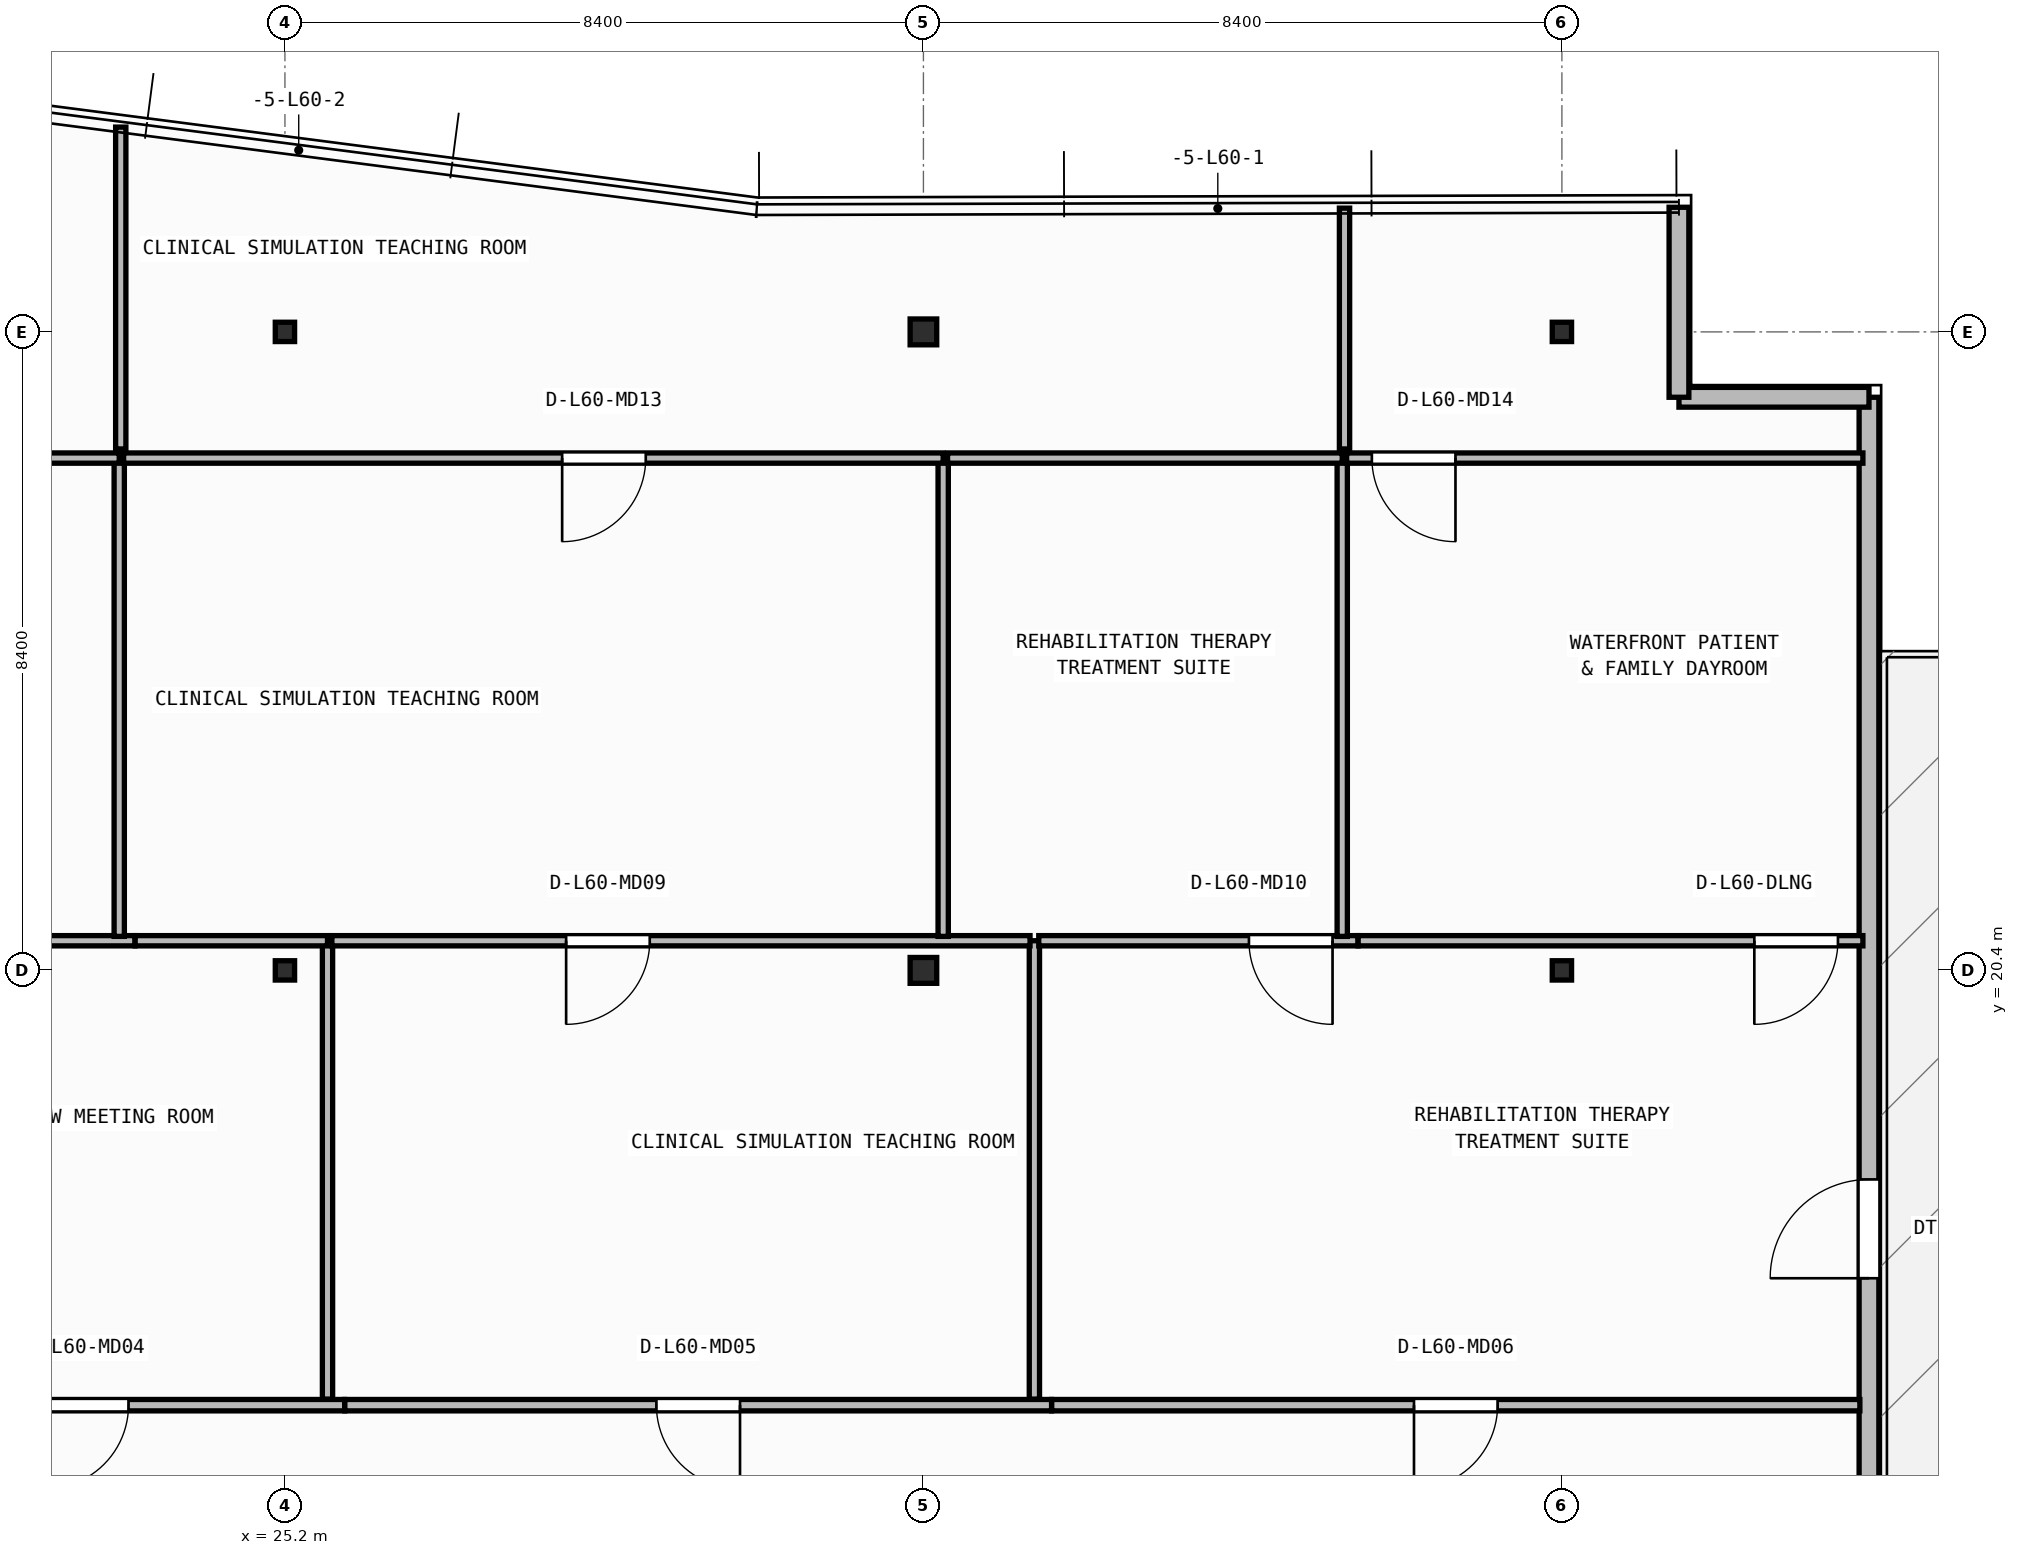
"""IFC4 building model, lengths in metres.
Left out: names, types, materials, properties, quantities, classifications, styles, units other than length and angle.
Written with IfcOpenShell. Run it as: python <this file> out.ifc"""

import sys

from ifc_helpers import new_model, si_unit, direction, frame, frame_2d, origin, origin_2d, place, context, subcontext, project, spatial, rectangle, i_section, extrude, element, fill, save


model = new_model("IFC4")
c1 = context("Model", 3, precision=1e-05, world=origin(), true_north=direction((0.0, 1.0)))
c2 = subcontext(c1, "Body", "Model", "MODEL_VIEW")
j1 = project(units=[si_unit("LENGTHUNIT", "METRE"), si_unit("PLANEANGLEUNIT", "RADIAN")], contexts=[c1])
p1 = place(None, origin())
s1 = spatial("IfcSite", under=j1, at=p1, CompositionType="ELEMENT")
p2 = place(p1, origin())
s2 = spatial("IfcBuilding", under=s1, at=p2, CompositionType="ELEMENT")
p3 = place(p2, frame((0.0, 0.0, 244.7)))
s3 = spatial("IfcBuildingStorey", under=s2, at=p3, CompositionType="ELEMENT", Elevation=244.7)
p4 = place(p3, frame((25.2, 20.4, 0.0), z_axis=(0.0, 0.0, 1.0), x_axis=(1.0, 0.0, 0.0)))
e1 = element("IfcColumn", 1, at=p4, inside=s3, PredefinedType="COLUMN", context=c2, shape_type="SweptSolid", body=[
    extrude(i_section(OverallWidth=0.254, OverallDepth=0.254, WebThickness=0.009, FlangeThickness=0.014, FilletRadius=0.013, at=origin_2d()), origin(), (0.0, 0.0, 1.0), 3.95),
])
p5 = place(p3, frame((33.6, 20.4, 0.0), z_axis=(0.0, 0.0, 1.0), x_axis=(1.0, 0.0, 0.0)))
e2 = element("IfcColumn", 2, at=p5, inside=s3, PredefinedType="COLUMN", context=c2, shape_type="SweptSolid", body=[
    extrude(i_section(OverallWidth=0.35, OverallDepth=0.34, WebThickness=0.016, FlangeThickness=0.028, at=origin_2d()), origin(), (0.0, 0.0, 1.0), 3.95),
])
for number, where, z_axis, x_axis in (
    (3, (42.0, 20.4, 0.0), (0.0, 0.0, 1.0), (1.0, 0.0, 0.0)),
    (4, (25.2, 28.8, 0.0), (0.0, 0.0, 1.0), (1.0, 0.0, 0.0)),
):
    element("IfcColumn", number, at=place(p3, frame(where, z_axis=z_axis, x_axis=x_axis)), inside=s3, PredefinedType="COLUMN", context=c2, shape_type="SweptSolid", body=[
        extrude(i_section(OverallWidth=0.254, OverallDepth=0.254, WebThickness=0.009, FlangeThickness=0.014, FilletRadius=0.013, at=origin_2d()), origin(), (0.0, 0.0, 1.0), 3.95),
    ])
p6 = place(p3, frame((33.6, 28.8, 0.0), z_axis=(0.0, 0.0, 1.0), x_axis=(1.0, 0.0, 0.0)))
e5 = element("IfcColumn", 5, at=p6, inside=s3, PredefinedType="COLUMN", context=c2, shape_type="SweptSolid", body=[
    extrude(i_section(OverallWidth=0.35, OverallDepth=0.34, WebThickness=0.016, FlangeThickness=0.028, at=origin_2d()), origin(), (0.0, 0.0, 1.0), 3.95),
])
p7 = place(p3, frame((42.0, 28.8, 0.0), z_axis=(0.0, 0.0, 1.0), x_axis=(1.0, 0.0, 0.0)))
e6 = element("IfcColumn", 6, at=p7, inside=s3, PredefinedType="COLUMN", context=c2, shape_type="SweptSolid", body=[
    extrude(i_section(OverallWidth=0.254, OverallDepth=0.254, WebThickness=0.009, FlangeThickness=0.014, FilletRadius=0.013, at=origin_2d()), origin(), (0.0, 0.0, 1.0), 3.95),
])
p8 = place(p3, frame((46.04, 6.06, 0.0), z_axis=(0.0, 0.0, 1.0), x_axis=(0.0, 1.0, 0.0)))
e7 = element("IfcWall", 7, at=p8, inside=s3, PredefinedType="STANDARD", context=c2, shape_type="SweptSolid", body=[
    extrude(rectangle(XDim=21.88, YDim=0.26, at=frame_2d((10.94, 0.0))), origin(), (0.0, 0.0, 1.0), 3.71),
])
p9 = place(p8, frame((10.29, 0.0, 0.0)))
e8 = element("IfcOpeningElement", 8, at=p9, cuts=e7, PredefinedType="OPENING", context=c2, shape_type="SweptSolid", body=[
    extrude(rectangle(XDim=1.3, YDim=2.15, at=frame_2d((0.65, 1.075))), frame((0.0, 0.14, 0.0), z_axis=(0.0, -1.0, 0.0), x_axis=(1.0, 0.0, 0.0)), (0.0, 0.0, 1.0), 0.28),
])
p10 = place(p3, frame((46.04, 27.94, 0.0), z_axis=(0.0, 0.0, 1.0), x_axis=(-1.0, 0.0, 0.0)))
e9 = element("IfcWall", 9, at=p10, inside=s3, PredefinedType="STANDARD", context=c2, shape_type="SweptSolid", body=[
    extrude(rectangle(XDim=2.5, YDim=0.26, at=frame_2d((1.25, 0.0))), origin(), (0.0, 0.0, 1.0), 3.71),
])
p11 = place(p3, frame((43.54, 27.94, 0.0), z_axis=(0.0, 0.0, 1.0), x_axis=(0.0, 1.0, 0.0)))
e10 = element("IfcWall", 10, at=p11, inside=s3, PredefinedType="STANDARD", context=c2, shape_type="SweptSolid", body=[
    extrude(rectangle(XDim=2.5, YDim=0.26, at=frame_2d((1.25, 0.0))), origin(), (0.0, 0.0, 1.0), 3.71),
])
p12 = place(p3, frame((25.986, 14.68, 0.0), z_axis=(0.0, 0.0, 1.0), x_axis=(-1.0, 0.0, 0.0)))
e11 = element("IfcWall", 11, at=p12, inside=s3, PredefinedType="PARTITIONING", context=c2, shape_type="SweptSolid", body=[
    extrude(rectangle(XDim=6.788, YDim=0.15, at=frame_2d((3.394, 0.0))), origin(), (0.0, 0.0, 1.0), 3.71),
])
p13 = place(p12, frame((2.844, 0.0, 0.0)))
e12 = element("IfcOpeningElement", 12, at=p13, cuts=e11, PredefinedType="OPENING", context=c2, shape_type="SweptSolid", body=[
    extrude(rectangle(XDim=1.1, YDim=2.1, at=frame_2d((0.55, 1.05))), frame((0.0, 0.085, 0.0), z_axis=(0.0, -1.0, 0.0), x_axis=(1.0, 0.0, 0.0)), (0.0, 0.0, 1.0), 0.17),
])
p14 = place(p3, frame((35.286, 14.68, 0.0), z_axis=(0.0, 0.0, 1.0), x_axis=(-1.0, 0.0, 0.0)))
e13 = element("IfcWall", 13, at=p14, inside=s3, PredefinedType="PARTITIONING", context=c2, shape_type="SweptSolid", body=[
    extrude(rectangle(XDim=9.298, YDim=0.15, at=frame_2d((4.649, 0.0))), origin(), (0.0, 0.0, 1.0), 3.71),
])
p15 = place(p14, frame((4.099, 0.0, 0.0)))
e14 = element("IfcOpeningElement", 14, at=p15, cuts=e13, PredefinedType="OPENING", context=c2, shape_type="SweptSolid", body=[
    extrude(rectangle(XDim=1.1, YDim=2.1, at=frame_2d((0.55, 1.05))), frame((0.0, 0.085, 0.0), z_axis=(0.0, -1.0, 0.0), x_axis=(1.0, 0.0, 0.0)), (0.0, 0.0, 1.0), 0.17),
])
p16 = place(p3, frame((45.92, 14.68, 0.0), z_axis=(0.0, 0.0, 1.0), x_axis=(-1.0, 0.0, 0.0)))
e15 = element("IfcWall", 15, at=p16, inside=s3, PredefinedType="PARTITIONING", context=c2, shape_type="SweptSolid", body=[
    extrude(rectangle(XDim=10.632, YDim=0.15, at=frame_2d((5.316, 0.0))), origin(), (0.0, 0.0, 1.0), 3.71),
])
p17 = place(p16, frame((4.766, 0.0, 0.0)))
e16 = element("IfcOpeningElement", 16, at=p17, cuts=e15, PredefinedType="OPENING", context=c2, shape_type="SweptSolid", body=[
    extrude(rectangle(XDim=1.1, YDim=2.1, at=frame_2d((0.55, 1.05))), frame((0.0, 0.085, 0.0), z_axis=(0.0, -1.0, 0.0), x_axis=(1.0, 0.0, 0.0)), (0.0, 0.0, 1.0), 0.17),
])
p18 = place(p3, frame((25.76, 14.76, 0.0), z_axis=(0.0, 0.0, 1.0), x_axis=(0.0, 1.0, 0.0)))
e17 = element("IfcWall", 17, at=p18, inside=s3, PredefinedType="PARTITIONING", context=c2, shape_type="SweptSolid", body=[
    extrude(rectangle(XDim=6.03, YDim=0.135, at=frame_2d((3.015, 0.0))), origin(), (0.0, 0.0, 1.0), 3.71),
])
p19 = place(p3, frame((23.228, 20.79, 0.0), z_axis=(0.0, 0.0, 1.0), x_axis=(-1.0, 0.0, 0.0)))
e18 = element("IfcWall", 18, at=p19, inside=s3, PredefinedType="PARTITIONING", context=c2, shape_type="SweptSolid", body=[
    extrude(rectangle(XDim=4.2, YDim=0.135, at=frame_2d((2.1, 0.0))), origin(), (0.0, 0.0, 1.0), 3.157),
])
p20 = place(p3, frame((25.76, 20.79, 0.0), z_axis=(0.0, 0.0, 1.0), x_axis=(-1.0, 0.0, 0.0)))
e19 = element("IfcWall", 19, at=p20, inside=s3, PredefinedType="PARTITIONING", context=c2, shape_type="SweptSolid", body=[
    extrude(rectangle(XDim=2.531, YDim=0.135, at=frame_2d((1.265, 0.0))), origin(), (0.0, 0.0, 1.0), 3.157),
])
p21 = place(p3, frame((35.06, 14.76, 0.0), z_axis=(0.0, 0.0, 1.0), x_axis=(0.0, 1.0, 0.0)))
e20 = element("IfcWall", 20, at=p21, inside=s3, PredefinedType="PARTITIONING", context=c2, shape_type="SweptSolid", body=[
    extrude(rectangle(XDim=6.03, YDim=0.135, at=frame_2d((3.015, 0.0))), origin(), (0.0, 0.0, 1.0), 3.71),
])
p22 = place(p3, frame((35.002, 20.79, 0.0), z_axis=(0.0, 0.0, 1.0), x_axis=(-1.0, 0.0, 0.0)))
e21 = element("IfcWall", 21, at=p22, inside=s3, PredefinedType="PARTITIONING", context=c2, shape_type="SweptSolid", body=[
    extrude(rectangle(XDim=9.185, YDim=0.135, at=frame_2d((4.593, 0.0))), origin(), (0.0, 0.0, 1.0), 3.157),
])
p23 = place(p22, frame((5.003, 0.0, 0.0)))
e22 = element("IfcOpeningElement", 22, at=p23, cuts=e21, PredefinedType="OPENING", context=c2, shape_type="SweptSolid", body=[
    extrude(rectangle(XDim=1.1, YDim=2.1, at=frame_2d((0.55, 1.05))), frame((0.0, 0.077, 0.0), z_axis=(0.0, -1.0, 0.0), x_axis=(1.0, 0.0, 0.0)), (0.0, 0.0, 1.0), 0.155),
])
p24 = place(p3, frame((39.317, 20.79, 0.0), z_axis=(0.0, 0.0, 1.0), x_axis=(-1.0, 0.0, 0.0)))
e23 = element("IfcWall", 23, at=p24, inside=s3, PredefinedType="PARTITIONING", context=c2, shape_type="SweptSolid", body=[
    extrude(rectangle(XDim=4.2, YDim=0.135, at=frame_2d((2.1, 0.0))), origin(), (0.0, 0.0, 1.0), 3.157),
])
p25 = place(p24, frame((0.335, 0.0, 0.0)))
e24 = element("IfcOpeningElement", 24, at=p25, cuts=e23, PredefinedType="OPENING", context=c2, shape_type="SweptSolid", body=[
    extrude(rectangle(XDim=1.1, YDim=2.1, at=frame_2d((0.55, 1.05))), frame((0.0, 0.077, 0.0), z_axis=(0.0, -1.0, 0.0), x_axis=(1.0, 0.0, 0.0)), (0.0, 0.0, 1.0), 0.155),
])
p26 = place(p3, frame((45.96, 20.79, 0.0), z_axis=(0.0, 0.0, 1.0), x_axis=(-1.0, 0.0, 0.0)))
e25 = element("IfcWall", 25, at=p26, inside=s3, PredefinedType="PARTITIONING", context=c2, shape_type="SweptSolid", body=[
    extrude(rectangle(XDim=6.64, YDim=0.135, at=frame_2d((3.32, 0.0))), origin(), (0.0, 0.0, 1.0), 3.157),
])
p27 = place(p26, frame((0.329, 0.0, 0.0)))
e26 = element("IfcOpeningElement", 26, at=p27, cuts=e25, PredefinedType="OPENING", context=c2, shape_type="SweptSolid", body=[
    extrude(rectangle(XDim=1.1, YDim=2.1, at=frame_2d((0.55, 1.05))), frame((0.0, 0.077, 0.0), z_axis=(0.0, -1.0, 0.0), x_axis=(1.0, 0.0, 0.0)), (0.0, 0.0, 1.0), 0.155),
])
p28 = place(p3, frame((23.02, 20.847, 0.0), z_axis=(0.0, 0.0, 1.0), x_axis=(0.0, 1.0, 0.0)))
e27 = element("IfcWall", 27, at=p28, inside=s3, PredefinedType="PARTITIONING", context=c2, shape_type="SweptSolid", body=[
    extrude(rectangle(XDim=6.292, YDim=0.135, at=frame_2d((3.146, 0.0))), origin(), (0.0, 0.0, 1.0), 3.71),
])
p29 = place(p3, frame((23.02, 27.14, 0.0), z_axis=(0.0, 0.0, 1.0), x_axis=(-1.0, 0.0, 0.0)))
e28 = element("IfcWall", 28, at=p29, inside=s3, PredefinedType="PARTITIONING", context=c2, shape_type="SweptSolid", body=[
    extrude(rectangle(XDim=9.24, YDim=0.135, at=frame_2d((4.62, 0.0))), origin(), (0.0, 0.0, 1.0), 3.71),
])
p30 = place(p3, frame((33.86, 20.847, 0.0), z_axis=(0.0, 0.0, 1.0), x_axis=(0.0, 1.0, 0.0)))
e29 = element("IfcWall", 29, at=p30, inside=s3, PredefinedType="PARTITIONING", context=c2, shape_type="SweptSolid", body=[
    extrude(rectangle(XDim=6.292, YDim=0.135, at=frame_2d((3.146, 0.0))), origin(), (0.0, 0.0, 1.0), 3.157),
])
p31 = place(p3, frame((33.86, 27.14, 0.0), z_axis=(0.0, 0.0, 1.0), x_axis=(-1.0, 0.0, 0.0)))
e30 = element("IfcWall", 30, at=p31, inside=s3, PredefinedType="PARTITIONING", context=c2, shape_type="SweptSolid", body=[
    extrude(rectangle(XDim=10.783, YDim=0.135, at=frame_2d((5.391, 0.0))), origin(), (0.0, 0.0, 1.0), 3.71),
])
p32 = place(p31, frame((3.913, 0.0, 0.0)))
e31 = element("IfcOpeningElement", 31, at=p32, cuts=e30, PredefinedType="OPENING", context=c2, shape_type="SweptSolid", body=[
    extrude(rectangle(XDim=1.1, YDim=2.1, at=frame_2d((0.55, 1.05))), frame((0.0, 0.077, 0.0), z_axis=(0.0, -1.0, 0.0), x_axis=(1.0, 0.0, 0.0)), (0.0, 0.0, 1.0), 0.155),
])
p33 = place(p3, frame((39.11, 20.847, 0.0), z_axis=(0.0, 0.0, 1.0), x_axis=(0.0, 1.0, 0.0)))
e32 = element("IfcWall", 32, at=p33, inside=s3, PredefinedType="PARTITIONING", context=c2, shape_type="SweptSolid", body=[
    extrude(rectangle(XDim=6.292, YDim=0.135, at=frame_2d((3.146, 0.0))), origin(), (0.0, 0.0, 1.0), 3.71),
])
p34 = place(p3, frame((39.11, 27.14, 0.0), z_axis=(0.0, 0.0, 1.0), x_axis=(-1.0, 0.0, 0.0)))
e33 = element("IfcWall", 33, at=p34, inside=s3, PredefinedType="PARTITIONING", context=c2, shape_type="SweptSolid", body=[
    extrude(rectangle(XDim=5.193, YDim=0.135, at=frame_2d((2.596, 0.0))), origin(), (0.0, 0.0, 1.0), 3.71),
])
p35 = place(p3, frame((45.96, 27.14, 0.0), z_axis=(0.0, 0.0, 1.0), x_axis=(-1.0, 0.0, 0.0)))
e34 = element("IfcWall", 34, at=p35, inside=s3, PredefinedType="PARTITIONING", context=c2, shape_type="SweptSolid", body=[
    extrude(rectangle(XDim=6.792, YDim=0.135, at=frame_2d((3.396, 0.0))), origin(), (0.0, 0.0, 1.0), 3.71),
])
p36 = place(p35, frame((5.36, 0.0, 0.0)))
e35 = element("IfcOpeningElement", 35, at=p36, cuts=e34, PredefinedType="OPENING", context=c2, shape_type="SweptSolid", body=[
    extrude(rectangle(XDim=1.1, YDim=2.1, at=frame_2d((0.55, 1.05))), frame((0.0, 0.077, 0.0), z_axis=(0.0, -1.0, 0.0), x_axis=(1.0, 0.0, 0.0)), (0.0, 0.0, 1.0), 0.155),
])
p37 = place(p3, frame((23.04, 27.26, 0.0), z_axis=(0.0, 0.0, 1.0), x_axis=(0.0, 1.0, 0.0)))
e36 = element("IfcWall", 36, at=p37, inside=s3, PredefinedType="PARTITIONING", context=c2, shape_type="SweptSolid", body=[
    extrude(rectangle(XDim=4.234, YDim=0.135, at=frame_2d((2.117, 0.0))), origin(), (0.0, 0.0, 1.0), 3.71),
])
p38 = place(p3, frame((39.14, 27.26, 0.0), z_axis=(0.0, 0.0, 1.0), x_axis=(0.0, 1.0, 0.0)))
e37 = element("IfcWall", 37, at=p38, inside=s3, PredefinedType="PARTITIONING", context=c2, shape_type="SweptSolid", body=[
    extrude(rectangle(XDim=3.168, YDim=0.135, at=frame_2d((1.584, 0.0))), origin(), (0.0, 0.0, 1.0), 3.71),
])
p39 = place(p9, origin())
e38 = element("IfcDoor", 38, at=p39, inside=s3, OperationType="SINGLE_SWING_LEFT", PredefinedType="DOOR", context=c2, shape_type="SweptSolid", body=[
    extrude(rectangle(XDim=1.3, YDim=2.15, at=frame_2d((0.65, 1.075))), frame((0.0, 0.025, 0.0), z_axis=(0.0, -1.0, 0.0), x_axis=(1.0, 0.0, 0.0)), (0.0, 0.0, 1.0), 0.05),
])
fill(e8, e38)
p40 = place(p13, origin())
e39 = element("IfcDoor", 39, at=p40, inside=s3, OperationType="SINGLE_SWING_RIGHT", PredefinedType="DOOR", context=c2, shape_type="SweptSolid", body=[
    extrude(rectangle(XDim=1.1, YDim=2.1, at=frame_2d((0.55, 1.05))), frame((0.0, 0.025, 0.0), z_axis=(0.0, -1.0, 0.0), x_axis=(1.0, 0.0, 0.0)), (0.0, 0.0, 1.0), 0.05),
])
fill(e12, e39)
p41 = place(p15, origin())
e40 = element("IfcDoor", 40, at=p41, inside=s3, OperationType="SINGLE_SWING_LEFT", PredefinedType="DOOR", context=c2, shape_type="SweptSolid", body=[
    extrude(rectangle(XDim=1.1, YDim=2.1, at=frame_2d((0.55, 1.05))), frame((0.0, 0.025, 0.0), z_axis=(0.0, -1.0, 0.0), x_axis=(1.0, 0.0, 0.0)), (0.0, 0.0, 1.0), 0.05),
])
fill(e14, e40)
p42 = place(p17, origin())
e41 = element("IfcDoor", 41, at=p42, inside=s3, OperationType="SINGLE_SWING_RIGHT", PredefinedType="DOOR", context=c2, shape_type="SweptSolid", body=[
    extrude(rectangle(XDim=1.1, YDim=2.1, at=frame_2d((0.55, 1.05))), frame((0.0, 0.025, 0.0), z_axis=(0.0, -1.0, 0.0), x_axis=(1.0, 0.0, 0.0)), (0.0, 0.0, 1.0), 0.05),
])
fill(e16, e41)
p43 = place(p23, origin())
e42 = element("IfcDoor", 42, at=p43, inside=s3, OperationType="SINGLE_SWING_RIGHT", PredefinedType="DOOR", context=c2, shape_type="SweptSolid", body=[
    extrude(rectangle(XDim=1.1, YDim=2.1, at=frame_2d((0.55, 1.05))), frame((0.0, 0.025, 0.0), z_axis=(0.0, -1.0, 0.0), x_axis=(1.0, 0.0, 0.0)), (0.0, 0.0, 1.0), 0.05),
])
fill(e22, e42)
p44 = place(p25, origin())
e43 = element("IfcDoor", 43, at=p44, inside=s3, OperationType="SINGLE_SWING_LEFT", PredefinedType="DOOR", context=c2, shape_type="SweptSolid", body=[
    extrude(rectangle(XDim=1.1, YDim=2.1, at=frame_2d((0.55, 1.05))), frame((0.0, 0.025, 0.0), z_axis=(0.0, -1.0, 0.0), x_axis=(1.0, 0.0, 0.0)), (0.0, 0.0, 1.0), 0.05),
])
fill(e24, e43)
p45 = place(p27, origin())
e44 = element("IfcDoor", 44, at=p45, inside=s3, OperationType="SINGLE_SWING_RIGHT", PredefinedType="DOOR", context=c2, shape_type="SweptSolid", body=[
    extrude(rectangle(XDim=1.1, YDim=2.1, at=frame_2d((0.55, 1.05))), frame((0.0, 0.025, 0.0), z_axis=(0.0, -1.0, 0.0), x_axis=(1.0, 0.0, 0.0)), (0.0, 0.0, 1.0), 0.05),
])
fill(e26, e44)
p46 = place(p32, origin())
e45 = element("IfcDoor", 45, at=p46, inside=s3, OperationType="SINGLE_SWING_RIGHT", PredefinedType="DOOR", context=c2, shape_type="SweptSolid", body=[
    extrude(rectangle(XDim=1.1, YDim=2.1, at=frame_2d((0.55, 1.05))), frame((0.0, 0.025, 0.0), z_axis=(0.0, -1.0, 0.0), x_axis=(1.0, 0.0, 0.0)), (0.0, 0.0, 1.0), 0.05),
])
fill(e31, e45)
p47 = place(p36, origin())
e46 = element("IfcDoor", 46, at=p47, inside=s3, OperationType="SINGLE_SWING_LEFT", PredefinedType="DOOR", context=c2, shape_type="SweptSolid", body=[
    extrude(rectangle(XDim=1.1, YDim=2.1, at=frame_2d((0.55, 1.05))), frame((0.0, 0.025, 0.0), z_axis=(0.0, -1.0, 0.0), x_axis=(1.0, 0.0, 0.0)), (0.0, 0.0, 1.0), 0.05),
])
fill(e35, e46)
save(model, sys.argv[1])
